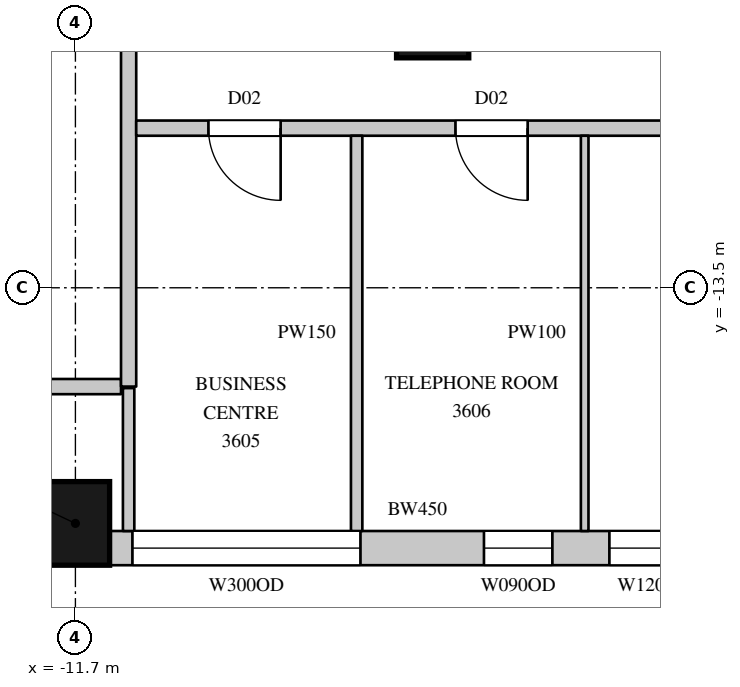
"""IFC4 building model, lengths in metres.
Left out: names, types, materials, properties, quantities, classifications, styles, units other than length and angle.
Written with IfcOpenShell. Run it as: python <this file> out.ifc"""

import sys

from ifc_helpers import new_model, si_unit, direction, frame, frame_2d, origin, origin_2d, place, context, subcontext, project, spatial, rectangle, circle, extrude, element, fill, save


model = new_model("IFC4")
c1 = context("Model", 3, precision=1e-05, world=origin(), true_north=direction((0.0, 1.0)))
c2 = subcontext(c1, "Body", "Model", "MODEL_VIEW")
j1 = project(units=[si_unit("LENGTHUNIT", "METRE"), si_unit("PLANEANGLEUNIT", "RADIAN")], contexts=[c1])
p1 = place(None, origin())
s1 = spatial("IfcSite", under=j1, at=p1, CompositionType="ELEMENT")
p2 = place(p1, origin())
s2 = spatial("IfcBuilding", under=s1, at=p2, CompositionType="ELEMENT")
p3 = place(p2, frame((0.0, 0.0, 168.7)))
s3 = spatial("IfcBuildingStorey", under=s2, at=p3, CompositionType="ELEMENT", Elevation=168.7)
p4 = place(p3, frame((-11.7, -16.6, 0.0), z_axis=(0.0, 0.0, 1.0), x_axis=(1.0, 0.0, 0.0)))
e1 = element("IfcColumn", 1, at=p4, inside=s3, PredefinedType="COLUMN", context=c2, shape_type="SweptSolid", body=[
    extrude(rectangle(XDim=0.9, YDim=1.1, at=origin_2d()), origin(), (0.0, 0.0, 1.0), 4.1),
])
p5 = place(p3, frame((-7.0, -10.0, 0.0), z_axis=(0.0, 0.0, 1.0), x_axis=(1.0, 0.0, 0.0)))
e2 = element("IfcColumn", 2, at=p5, inside=s3, PredefinedType="COLUMN", context=c2, shape_type="SweptSolid", body=[
    extrude(circle(Radius=0.475, at=origin_2d()), origin(), (0.0, 0.0, 1.0), 4.1),
])
p6 = place(p3, frame((-11.25, -16.925, 0.0), z_axis=(0.0, 0.0, 1.0), x_axis=(1.0, 0.0, 0.0)))
e3 = element("IfcWall", 3, at=p6, inside=s3, PredefinedType="SOLIDWALL", context=c2, shape_type="SweptSolid", body=[
    extrude(rectangle(XDim=8.1, YDim=0.45, at=frame_2d((4.05, 0.0))), origin(), (0.0, 0.0, 1.0), 3.8),
])
p7 = place(p6, frame((0.3, 0.0, 1.05)))
e4 = element("IfcOpeningElement", 4, at=p7, cuts=e3, PredefinedType="OPENING", context=c2, shape_type="SweptSolid", body=[
    extrude(rectangle(XDim=3.0, YDim=2.4, at=frame_2d((1.5, 1.2))), frame((0.0, 0.235, 0.0), z_axis=(0.0, -1.0, 0.0), x_axis=(1.0, 0.0, 0.0)), (0.0, 0.0, 1.0), 0.47),
])
p8 = place(p6, frame((4.925, 0.0, 1.05)))
e5 = element("IfcOpeningElement", 5, at=p8, cuts=e3, PredefinedType="OPENING", context=c2, shape_type="SweptSolid", body=[
    extrude(rectangle(XDim=0.9, YDim=2.4, at=frame_2d((0.45, 1.2))), frame((0.0, 0.235, 0.0), z_axis=(0.0, -1.0, 0.0), x_axis=(1.0, 0.0, 0.0)), (0.0, 0.0, 1.0), 0.47),
])
p9 = place(p6, frame((6.575, 0.0, 1.05)))
e6 = element("IfcOpeningElement", 6, at=p9, cuts=e3, PredefinedType="OPENING", context=c2, shape_type="SweptSolid", body=[
    extrude(rectangle(XDim=1.2, YDim=2.4, at=frame_2d((0.6, 1.2))), frame((0.0, 0.235, 0.0), z_axis=(0.0, -1.0, 0.0), x_axis=(1.0, 0.0, 0.0)), (0.0, 0.0, 1.0), 0.47),
])
p10 = place(p3, frame((-13.97, -14.8, 0.0), z_axis=(0.0, 0.0, 1.0), x_axis=(1.0, 0.0, 0.0)))
e7 = element("IfcWall", 7, at=p10, inside=s3, PredefinedType="PARTITIONING", context=c2, shape_type="SweptSolid", body=[
    extrude(rectangle(XDim=2.87, YDim=0.2, at=frame_2d((1.435, 0.0))), origin(), (0.0, 0.0, 1.0), 3.8),
])
p11 = place(p3, frame((-11.0, -14.8, 0.0), z_axis=(0.0, 0.0, 1.0), x_axis=(0.0, 1.0, 0.0)))
e8 = element("IfcWall", 8, at=p11, inside=s3, PredefinedType="PARTITIONING", context=c2, shape_type="SweptSolid", body=[
    extrude(rectangle(XDim=29.6, YDim=0.2, at=frame_2d((14.8, 0.0))), origin(), (0.0, 0.0, 1.0), 3.8),
])
p12 = place(p11, frame((19.25, 0.0, 0.0)))
e9 = element("IfcOpeningElement", 9, at=p12, cuts=e8, PredefinedType="OPENING", context=c2, shape_type="SweptSolid", body=[
    extrude(rectangle(XDim=1.5, YDim=2.4, at=frame_2d((0.75, 1.2))), frame((0.0, 0.11, 0.0), z_axis=(0.0, -1.0, 0.0), x_axis=(1.0, 0.0, 0.0)), (0.0, 0.0, 1.0), 0.22),
])
p13 = place(p3, frame((-10.9, -11.4, 0.0), z_axis=(0.0, 0.0, 1.0), x_axis=(1.0, 0.0, 0.0)))
e10 = element("IfcWall", 10, at=p13, inside=s3, PredefinedType="PARTITIONING", context=c2, shape_type="SweptSolid", body=[
    extrude(rectangle(XDim=21.2, YDim=0.2, at=frame_2d((10.6, 0.0))), origin(), (0.0, 0.0, 1.0), 3.8),
])
p14 = place(p13, frame((0.95, 0.0, 0.0)))
e11 = element("IfcOpeningElement", 11, at=p14, cuts=e10, PredefinedType="OPENING", context=c2, shape_type="SweptSolid", body=[
    extrude(rectangle(XDim=0.95, YDim=2.2, at=frame_2d((0.475, 1.1))), frame((0.0, 0.11, 0.0), z_axis=(0.0, -1.0, 0.0), x_axis=(1.0, 0.0, 0.0)), (0.0, 0.0, 1.0), 0.22),
])
p15 = place(p13, frame((4.2, 0.0, 0.0)))
e12 = element("IfcOpeningElement", 12, at=p15, cuts=e10, PredefinedType="OPENING", context=c2, shape_type="SweptSolid", body=[
    extrude(rectangle(XDim=0.95, YDim=2.2, at=frame_2d((0.475, 1.1))), frame((0.0, 0.11, 0.0), z_axis=(0.0, -1.0, 0.0), x_axis=(1.0, 0.0, 0.0)), (0.0, 0.0, 1.0), 0.22),
])
p16 = place(p13, frame((7.1, 0.0, 0.0)))
e13 = element("IfcOpeningElement", 13, at=p16, cuts=e10, PredefinedType="OPENING", context=c2, shape_type="SweptSolid", body=[
    extrude(rectangle(XDim=0.9, YDim=2.2, at=frame_2d((0.45, 1.1))), frame((0.0, 0.11, 0.0), z_axis=(0.0, -1.0, 0.0), x_axis=(1.0, 0.0, 0.0)), (0.0, 0.0, 1.0), 0.22),
])
p17 = place(p13, frame((10.0, 0.0, 0.0)))
e14 = element("IfcOpeningElement", 14, at=p17, cuts=e10, PredefinedType="OPENING", context=c2, shape_type="SweptSolid", body=[
    extrude(rectangle(XDim=0.9, YDim=2.2, at=frame_2d((0.45, 1.1))), frame((0.0, 0.11, 0.0), z_axis=(0.0, -1.0, 0.0), x_axis=(1.0, 0.0, 0.0)), (0.0, 0.0, 1.0), 0.22),
])
p18 = place(p13, frame((13.55, 0.0, 0.0)))
e15 = element("IfcOpeningElement", 15, at=p18, cuts=e10, PredefinedType="OPENING", context=c2, shape_type="SweptSolid", body=[
    extrude(rectangle(XDim=0.9, YDim=2.2, at=frame_2d((0.45, 1.1))), frame((0.0, 0.11, 0.0), z_axis=(0.0, -1.0, 0.0), x_axis=(1.0, 0.0, 0.0)), (0.0, 0.0, 1.0), 0.22),
])
p19 = place(p13, frame((17.85, 0.0, 0.0)))
e16 = element("IfcOpeningElement", 16, at=p19, cuts=e10, PredefinedType="OPENING", context=c2, shape_type="SweptSolid", body=[
    extrude(rectangle(XDim=1.1, YDim=2.4, at=frame_2d((0.55, 1.2))), frame((0.0, 0.11, 0.0), z_axis=(0.0, -1.0, 0.0), x_axis=(1.0, 0.0, 0.0)), (0.0, 0.0, 1.0), 0.22),
])
p20 = place(p3, frame((-11.0, -16.7, 0.0), z_axis=(0.0, 0.0, 1.0), x_axis=(0.0, 1.0, 0.0)))
e17 = element("IfcWall", 17, at=p20, inside=s3, PredefinedType="PARTITIONING", context=c2, shape_type="SweptSolid", body=[
    extrude(rectangle(XDim=1.88, YDim=0.15, at=frame_2d((0.94, 0.0))), origin(), (0.0, 0.0, 1.0), 3.8),
])
p21 = place(p3, frame((-8.0, -16.7, 0.0), z_axis=(0.0, 0.0, 1.0), x_axis=(0.0, 1.0, 0.0)))
e18 = element("IfcWall", 18, at=p21, inside=s3, PredefinedType="PARTITIONING", context=c2, shape_type="SweptSolid", body=[
    extrude(rectangle(XDim=5.2, YDim=0.15, at=frame_2d((2.6, 0.0))), origin(), (0.0, 0.0, 1.0), 3.8),
])
p22 = place(p3, frame((-5.0, -16.7, 0.0), z_axis=(0.0, 0.0, 1.0), x_axis=(0.0, 1.0, 0.0)))
e19 = element("IfcWall", 19, at=p22, inside=s3, PredefinedType="PARTITIONING", context=c2, shape_type="SweptSolid", body=[
    extrude(rectangle(XDim=5.2, YDim=0.1, at=frame_2d((2.6, 0.0))), origin(), (0.0, 0.0, 1.0), 3.8),
])
p23 = place(p7, origin())
e20 = element("IfcWindow", 20, at=p23, inside=s3, PartitioningType="SINGLE_PANEL", PredefinedType="WINDOW", context=c2, shape_type="SweptSolid", body=[
    extrude(rectangle(XDim=3.0, YDim=2.4, at=frame_2d((1.5, 1.2))), frame((0.0, 0.135, 0.0), z_axis=(0.0, -1.0, 0.0), x_axis=(1.0, 0.0, 0.0)), (0.0, 0.0, 1.0), 0.06),
])
fill(e4, e20)
p24 = place(p14, origin())
e21 = element("IfcDoor", 21, at=p24, inside=s3, OperationType="SINGLE_SWING_LEFT", PredefinedType="DOOR", context=c2, shape_type="SweptSolid", body=[
    extrude(rectangle(XDim=0.95, YDim=2.2, at=frame_2d((0.475, 1.1))), frame((0.0, 0.025, 0.0), z_axis=(0.0, -1.0, 0.0), x_axis=(1.0, 0.0, 0.0)), (0.0, 0.0, 1.0), 0.05),
])
fill(e11, e21)
p25 = place(p15, origin())
e22 = element("IfcDoor", 22, at=p25, inside=s3, OperationType="SINGLE_SWING_LEFT", PredefinedType="DOOR", context=c2, shape_type="SweptSolid", body=[
    extrude(rectangle(XDim=0.95, YDim=2.2, at=frame_2d((0.475, 1.1))), frame((0.0, 0.025, 0.0), z_axis=(0.0, -1.0, 0.0), x_axis=(1.0, 0.0, 0.0)), (0.0, 0.0, 1.0), 0.05),
])
fill(e12, e22)
p26 = place(p8, origin())
e23 = element("IfcWindow", 23, at=p26, inside=s3, PartitioningType="SINGLE_PANEL", PredefinedType="WINDOW", context=c2, shape_type="SweptSolid", body=[
    extrude(rectangle(XDim=0.9, YDim=2.4, at=frame_2d((0.45, 1.2))), frame((0.0, 0.135, 0.0), z_axis=(0.0, -1.0, 0.0), x_axis=(1.0, 0.0, 0.0)), (0.0, 0.0, 1.0), 0.06),
])
fill(e5, e23)
p27 = place(p9, origin())
e24 = element("IfcWindow", 24, at=p27, inside=s3, PartitioningType="SINGLE_PANEL", PredefinedType="WINDOW", context=c2, shape_type="SweptSolid", body=[
    extrude(rectangle(XDim=1.2, YDim=2.4, at=frame_2d((0.6, 1.2))), frame((0.0, 0.135, 0.0), z_axis=(0.0, -1.0, 0.0), x_axis=(1.0, 0.0, 0.0)), (0.0, 0.0, 1.0), 0.06),
])
fill(e6, e24)
save(model, sys.argv[1])
